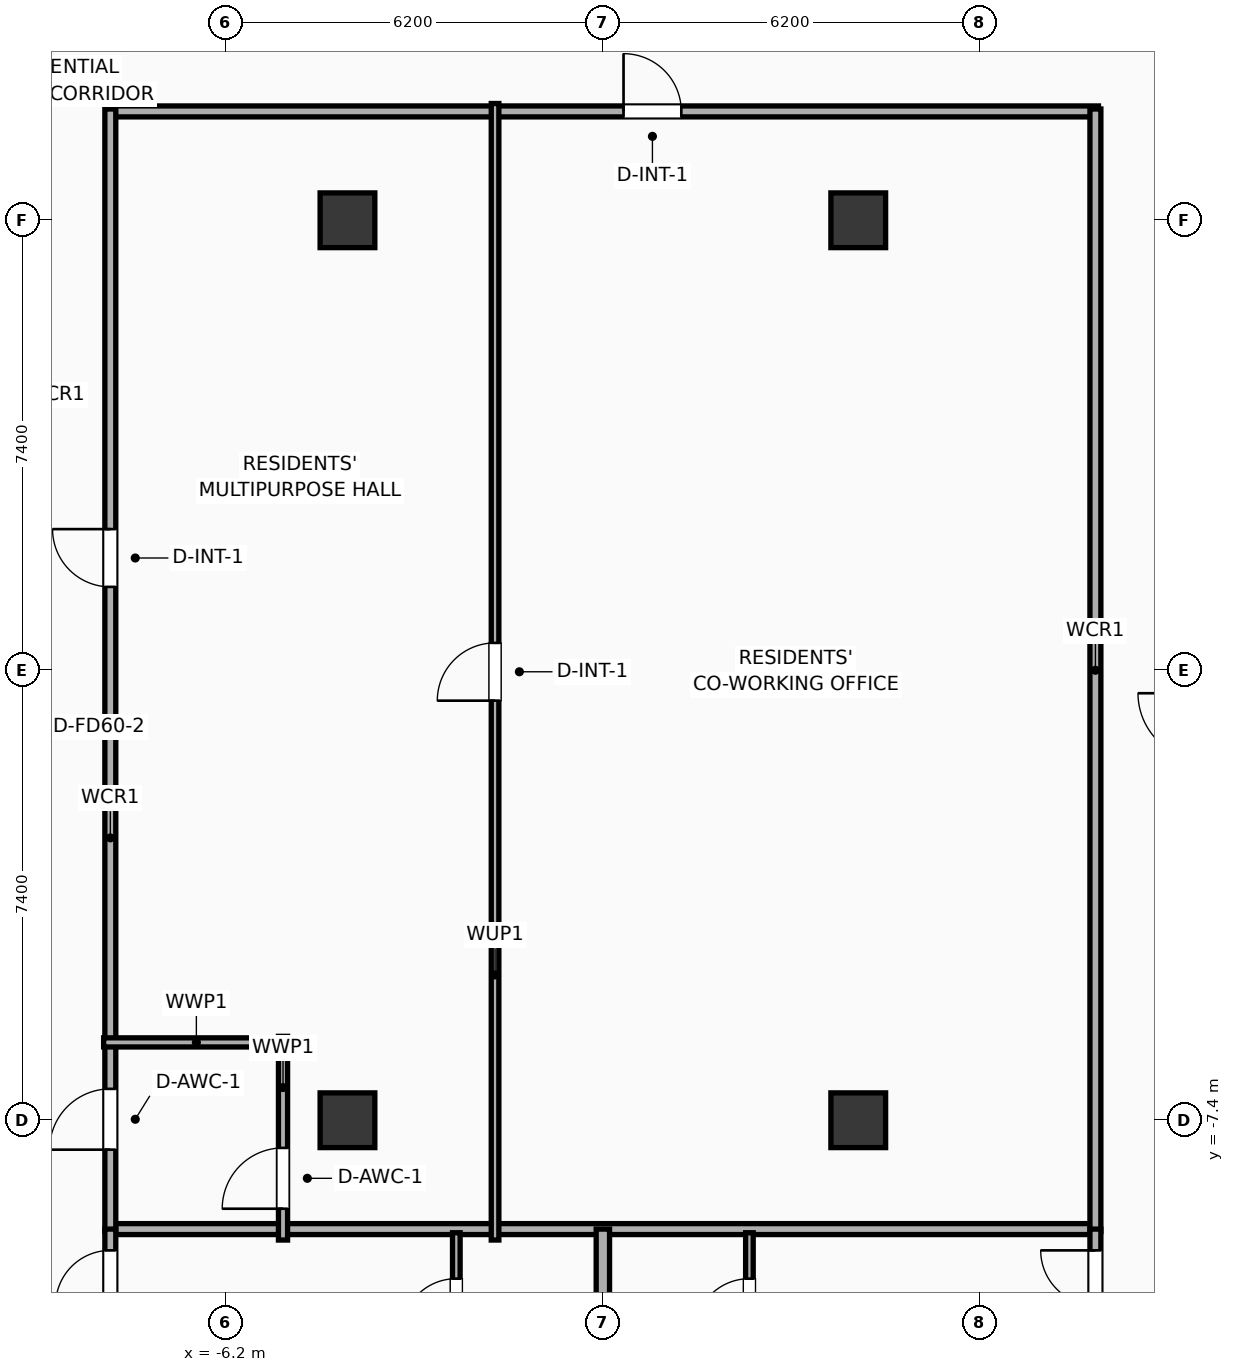
"""IFC4 building model, lengths in metres.
Left out: names, types, materials, properties, quantities, classifications, styles, units other than length and angle.
Written with IfcOpenShell. Run it as: python <this file> out.ifc"""

import sys

from ifc_helpers import new_model, si_unit, direction, frame, frame_2d, origin, origin_2d, place, context, subcontext, project, spatial, rectangle, extrude, element, fill, save


model = new_model("IFC4")
c1 = context("Model", 3, precision=1e-05, world=origin(), true_north=direction((0.0, 1.0)))
c2 = subcontext(c1, "Body", "Model", "MODEL_VIEW")
j1 = project(units=[si_unit("LENGTHUNIT", "METRE"), si_unit("PLANEANGLEUNIT", "RADIAN")], contexts=[c1])
p1 = place(None, origin())
s1 = spatial("IfcSite", under=j1, at=p1, CompositionType="ELEMENT")
p2 = place(p1, origin())
s2 = spatial("IfcBuilding", under=s1, at=p2, CompositionType="ELEMENT")
p3 = place(p2, frame((0.0, 0.0, 215.8)))
s3 = spatial("IfcBuildingStorey", under=s2, at=p3, CompositionType="ELEMENT", Elevation=215.8)
for number, where, z_axis, x_axis in (
    (1, (-4.2, -7.4, 0.0), (0.0, 0.0, 1.0), (1.0, 0.0, 0.0)),
    (2, (-4.2, 7.4, 0.0), (0.0, 0.0, 1.0), (1.0, 0.0, 0.0)),
    (3, (4.2, -7.4, 0.0), (0.0, 0.0, 1.0), (1.0, 0.0, 0.0)),
    (4, (4.2, 7.4, 0.0), (0.0, 0.0, 1.0), (1.0, 0.0, 0.0)),
):
    element("IfcColumn", number, at=place(p3, frame(where, z_axis=z_axis, x_axis=x_axis)), inside=s3, PredefinedType="COLUMN", context=c2, shape_type="SweptSolid", body=[
        extrude(rectangle(XDim=0.9, YDim=0.9, at=origin_2d()), origin(), (0.0, 0.0, 1.0), 3.9),
    ])
p4 = place(p3, frame((-8.15, 9.19, 0.0), z_axis=(0.0, 0.0, 1.0), x_axis=(1.0, 0.0, 0.0)))
e5 = element("IfcWall", 5, at=p4, inside=s3, PredefinedType="PARTITIONING", context=c2, shape_type="SweptSolid", body=[
    extrude(rectangle(XDim=16.3, YDim=0.18, at=frame_2d((8.15, 0.0))), origin(), (0.0, 0.0, 1.0), 3.65),
])
p5 = place(p4, frame((8.49, 0.0, 0.0)))
e6 = element("IfcOpeningElement", 6, at=p5, cuts=e5, PredefinedType="OPENING", context=c2, shape_type="SweptSolid", body=[
    extrude(rectangle(XDim=0.95, YDim=2.05, at=frame_2d((0.475, 1.025))), frame((0.0, 0.1, 0.0), z_axis=(0.0, -1.0, 0.0), x_axis=(1.0, 0.0, 0.0)), (0.0, 0.0, 1.0), 0.2),
])
p6 = place(p3, frame((-8.15, -9.19, 0.0), z_axis=(0.0, 0.0, 1.0), x_axis=(1.0, 0.0, 0.0)))
e7 = element("IfcWall", 7, at=p6, inside=s3, PredefinedType="PARTITIONING", context=c2, shape_type="SweptSolid", body=[
    extrude(rectangle(XDim=16.3, YDim=0.18, at=frame_2d((8.15, 0.0))), origin(), (0.0, 0.0, 1.0), 3.65),
])
p7 = place(p3, frame((-8.1, -9.23, 0.0), z_axis=(0.0, 0.0, 1.0), x_axis=(0.0, 1.0, 0.0)))
e8 = element("IfcWall", 8, at=p7, inside=s3, PredefinedType="PARTITIONING", context=c2, shape_type="SweptSolid", body=[
    extrude(rectangle(XDim=18.46, YDim=0.18, at=frame_2d((9.23, 0.0))), origin(), (0.0, 0.0, 1.0), 3.65),
])
p8 = place(p7, frame((1.346, 0.0, 0.0)))
e9 = element("IfcOpeningElement", 9, at=p8, cuts=e8, PredefinedType="OPENING", context=c2, shape_type="SweptSolid", body=[
    extrude(rectangle(XDim=1.0, YDim=2.05, at=frame_2d((0.5, 1.025))), frame((0.0, 0.1, 0.0), z_axis=(0.0, -1.0, 0.0), x_axis=(1.0, 0.0, 0.0)), (0.0, 0.0, 1.0), 0.2),
])
p9 = place(p7, frame((10.601, 0.0, 0.0)))
e10 = element("IfcOpeningElement", 10, at=p9, cuts=e8, PredefinedType="OPENING", context=c2, shape_type="SweptSolid", body=[
    extrude(rectangle(XDim=0.95, YDim=2.05, at=frame_2d((0.475, 1.025))), frame((0.0, 0.1, 0.0), z_axis=(0.0, -1.0, 0.0), x_axis=(1.0, 0.0, 0.0)), (0.0, 0.0, 1.0), 0.2),
])
p10 = place(p3, frame((8.1, -9.23, 0.0), z_axis=(0.0, 0.0, 1.0), x_axis=(0.0, 1.0, 0.0)))
e11 = element("IfcWall", 11, at=p10, inside=s3, PredefinedType="PARTITIONING", context=c2, shape_type="SweptSolid", body=[
    extrude(rectangle(XDim=18.46, YDim=0.18, at=frame_2d((9.23, 0.0))), origin(), (0.0, 0.0, 1.0), 3.65),
])
p11 = place(p3, frame((-5.26, -9.37, 0.0), z_axis=(0.0, 0.0, 1.0), x_axis=(0.0, 1.0, 0.0)))
e12 = element("IfcWall", 12, at=p11, inside=s3, PredefinedType="PLUMBINGWALL", context=c2, shape_type="SweptSolid", body=[
    extrude(rectangle(XDim=3.35, YDim=0.15, at=frame_2d((1.675, 0.0))), origin(), (0.0, 0.0, 1.0), 3.65),
])
p12 = place(p11, frame((0.515, 0.0, 0.0)))
e13 = element("IfcOpeningElement", 13, at=p12, cuts=e12, PredefinedType="OPENING", context=c2, shape_type="SweptSolid", body=[
    extrude(rectangle(XDim=1.0, YDim=2.05, at=frame_2d((0.5, 1.025))), frame((0.0, 0.085, 0.0), z_axis=(0.0, -1.0, 0.0), x_axis=(1.0, 0.0, 0.0)), (0.0, 0.0, 1.0), 0.17),
])
p13 = place(p3, frame((-8.21, -6.12, 0.0), z_axis=(0.0, 0.0, 1.0), x_axis=(1.0, 0.0, 0.0)))
e14 = element("IfcWall", 14, at=p13, inside=s3, PredefinedType="PLUMBINGWALL", context=c2, shape_type="SweptSolid", body=[
    extrude(rectangle(XDim=3.05, YDim=0.15, at=frame_2d((1.525, 0.0))), origin(), (0.0, 0.0, 1.0), 3.65),
])
p14 = place(p3, frame((-1.773, -9.37, 0.0), z_axis=(0.0, 0.0, 1.0), x_axis=(0.0, 1.0, 0.0)))
e15 = element("IfcWall", 15, at=p14, inside=s3, PredefinedType="PARTITIONING", context=c2, shape_type="SweptSolid", body=[
    extrude(rectangle(XDim=18.69, YDim=0.125, at=frame_2d((9.345, 0.0))), origin(), (0.0, 0.0, 1.0), 3.65),
])
p15 = place(p14, frame((8.87, 0.0, 0.0)))
e16 = element("IfcOpeningElement", 16, at=p15, cuts=e15, PredefinedType="OPENING", context=c2, shape_type="SweptSolid", body=[
    extrude(rectangle(XDim=0.95, YDim=2.05, at=frame_2d((0.475, 1.025))), frame((0.0, 0.073, 0.0), z_axis=(0.0, -1.0, 0.0), x_axis=(1.0, 0.0, 0.0)), (0.0, 0.0, 1.0), 0.145),
])
p16 = place(p3, frame((-2.41, -11.66, 0.0), z_axis=(0.0, 0.0, 1.0), x_axis=(0.0, 1.0, 0.0)))
e17 = element("IfcWall", 17, at=p16, inside=s3, PredefinedType="PARTITIONING", context=c2, shape_type="SweptSolid", body=[
    extrude(rectangle(XDim=2.41, YDim=0.125, at=frame_2d((1.205, 0.0))), origin(), (0.0, 0.0, 1.0), 3.65),
])
p17 = place(p16, frame((0.755, 0.0, 0.0)))
e18 = element("IfcOpeningElement", 18, at=p17, cuts=e17, PredefinedType="OPENING", context=c2, shape_type="SweptSolid", body=[
    extrude(rectangle(XDim=0.9, YDim=2.05, at=frame_2d((0.45, 1.025))), frame((0.0, 0.073, 0.0), z_axis=(0.0, -1.0, 0.0), x_axis=(1.0, 0.0, 0.0)), (0.0, 0.0, 1.0), 0.145),
])
p18 = place(p3, frame((-8.1, -18.83, 0.0), z_axis=(0.0, 0.0, 1.0), x_axis=(0.0, 1.0, 0.0)))
e19 = element("IfcWall", 19, at=p18, inside=s3, PredefinedType="PARTITIONING", context=c2, shape_type="SweptSolid", body=[
    extrude(rectangle(XDim=9.64, YDim=0.18, at=frame_2d((4.82, 0.0))), origin(), (0.0, 0.0, 1.0), 3.65),
])
p19 = place(p18, frame((8.39, 0.0, 0.0)))
e20 = element("IfcOpeningElement", 20, at=p19, cuts=e19, PredefinedType="OPENING", context=c2, shape_type="SweptSolid", body=[
    extrude(rectangle(XDim=0.9, YDim=2.05, at=frame_2d((0.45, 1.025))), frame((0.0, 0.1, 0.0), z_axis=(0.0, -1.0, 0.0), x_axis=(1.0, 0.0, 0.0)), (0.0, 0.0, 1.0), 0.2),
])
p20 = place(p3, frame((2.41, -11.66, 0.0), z_axis=(0.0, 0.0, 1.0), x_axis=(0.0, 1.0, 0.0)))
e21 = element("IfcWall", 21, at=p20, inside=s3, PredefinedType="PARTITIONING", context=c2, shape_type="SweptSolid", body=[
    extrude(rectangle(XDim=2.41, YDim=0.125, at=frame_2d((1.205, 0.0))), origin(), (0.0, 0.0, 1.0), 3.65),
])
p21 = place(p20, frame((0.755, 0.0, 0.0)))
e22 = element("IfcOpeningElement", 22, at=p21, cuts=e21, PredefinedType="OPENING", context=c2, shape_type="SweptSolid", body=[
    extrude(rectangle(XDim=0.9, YDim=2.05, at=frame_2d((0.45, 1.025))), frame((0.0, 0.073, 0.0), z_axis=(0.0, -1.0, 0.0), x_axis=(1.0, 0.0, 0.0)), (0.0, 0.0, 1.0), 0.145),
])
p22 = place(p3, frame((8.1, -18.83, 0.0), z_axis=(0.0, 0.0, 1.0), x_axis=(0.0, 1.0, 0.0)))
e23 = element("IfcWall", 23, at=p22, inside=s3, PredefinedType="PARTITIONING", context=c2, shape_type="SweptSolid", body=[
    extrude(rectangle(XDim=9.64, YDim=0.18, at=frame_2d((4.82, 0.0))), origin(), (0.0, 0.0, 1.0), 3.65),
])
p23 = place(p22, frame((8.39, 0.0, 0.0)))
e24 = element("IfcOpeningElement", 24, at=p23, cuts=e23, PredefinedType="OPENING", context=c2, shape_type="SweptSolid", body=[
    extrude(rectangle(XDim=0.9, YDim=2.05, at=frame_2d((0.45, 1.025))), frame((0.0, 0.1, 0.0), z_axis=(0.0, -1.0, 0.0), x_axis=(1.0, 0.0, 0.0)), (0.0, 0.0, 1.0), 0.2),
])
p24 = place(p3, frame((0.0, -18.83, 0.0), z_axis=(0.0, 0.0, 1.0), x_axis=(0.0, 1.0, 0.0)))
e25 = element("IfcWall", 25, at=p24, inside=s3, PredefinedType="PARTITIONING", context=c2, shape_type="SweptSolid", body=[
    extrude(rectangle(XDim=9.64, YDim=0.22, at=frame_2d((4.82, 0.0))), origin(), (0.0, 0.0, 1.0), 3.65),
])
p25 = place(p5, origin())
e26 = element("IfcDoor", 26, at=p25, inside=s3, OperationType="SINGLE_SWING_LEFT", PredefinedType="DOOR", context=c2, shape_type="SweptSolid", body=[
    extrude(rectangle(XDim=0.95, YDim=2.05, at=frame_2d((0.475, 1.025))), frame((0.0, 0.025, 0.0), z_axis=(0.0, -1.0, 0.0), x_axis=(1.0, 0.0, 0.0)), (0.0, 0.0, 1.0), 0.05),
])
fill(e6, e26)
p26 = place(p8, origin())
e27 = element("IfcDoor", 27, at=p26, inside=s3, OperationType="SINGLE_SWING_LEFT", PredefinedType="DOOR", context=c2, shape_type="SweptSolid", body=[
    extrude(rectangle(XDim=1.0, YDim=2.05, at=frame_2d((0.5, 1.025))), frame((0.0, 0.025, 0.0), z_axis=(0.0, -1.0, 0.0), x_axis=(1.0, 0.0, 0.0)), (0.0, 0.0, 1.0), 0.05),
])
fill(e9, e27)
p27 = place(p9, origin())
e28 = element("IfcDoor", 28, at=p27, inside=s3, OperationType="SINGLE_SWING_RIGHT", PredefinedType="DOOR", context=c2, shape_type="SweptSolid", body=[
    extrude(rectangle(XDim=0.95, YDim=2.05, at=frame_2d((0.475, 1.025))), frame((0.0, 0.025, 0.0), z_axis=(0.0, -1.0, 0.0), x_axis=(1.0, 0.0, 0.0)), (0.0, 0.0, 1.0), 0.05),
])
fill(e10, e28)
p28 = place(p12, origin())
e29 = element("IfcDoor", 29, at=p28, inside=s3, OperationType="SINGLE_SWING_LEFT", PredefinedType="DOOR", context=c2, shape_type="SweptSolid", body=[
    extrude(rectangle(XDim=1.0, YDim=2.05, at=frame_2d((0.5, 1.025))), frame((0.0, 0.025, 0.0), z_axis=(0.0, -1.0, 0.0), x_axis=(1.0, 0.0, 0.0)), (0.0, 0.0, 1.0), 0.05),
])
fill(e13, e29)
p29 = place(p15, origin())
e30 = element("IfcDoor", 30, at=p29, inside=s3, OperationType="SINGLE_SWING_LEFT", PredefinedType="DOOR", context=c2, shape_type="SweptSolid", body=[
    extrude(rectangle(XDim=0.95, YDim=2.05, at=frame_2d((0.475, 1.025))), frame((0.0, 0.025, 0.0), z_axis=(0.0, -1.0, 0.0), x_axis=(1.0, 0.0, 0.0)), (0.0, 0.0, 1.0), 0.05),
])
fill(e16, e30)
p30 = place(p17, origin())
e31 = element("IfcDoor", 31, at=p30, inside=s3, OperationType="SINGLE_SWING_LEFT", PredefinedType="DOOR", context=c2, shape_type="SweptSolid", body=[
    extrude(rectangle(XDim=0.9, YDim=2.05, at=frame_2d((0.45, 1.025))), frame((0.0, 0.025, 0.0), z_axis=(0.0, -1.0, 0.0), x_axis=(1.0, 0.0, 0.0)), (0.0, 0.0, 1.0), 0.05),
])
fill(e18, e31)
p31 = place(p19, origin())
e32 = element("IfcDoor", 32, at=p31, inside=s3, OperationType="SINGLE_SWING_LEFT", PredefinedType="DOOR", context=c2, shape_type="SweptSolid", body=[
    extrude(rectangle(XDim=0.9, YDim=2.05, at=frame_2d((0.45, 1.025))), frame((0.0, 0.025, 0.0), z_axis=(0.0, -1.0, 0.0), x_axis=(1.0, 0.0, 0.0)), (0.0, 0.0, 1.0), 0.05),
])
fill(e20, e32)
p32 = place(p21, origin())
e33 = element("IfcDoor", 33, at=p32, inside=s3, OperationType="SINGLE_SWING_LEFT", PredefinedType="DOOR", context=c2, shape_type="SweptSolid", body=[
    extrude(rectangle(XDim=0.9, YDim=2.05, at=frame_2d((0.45, 1.025))), frame((0.0, 0.025, 0.0), z_axis=(0.0, -1.0, 0.0), x_axis=(1.0, 0.0, 0.0)), (0.0, 0.0, 1.0), 0.05),
])
fill(e22, e33)
p33 = place(p23, origin())
e34 = element("IfcDoor", 34, at=p33, inside=s3, OperationType="SINGLE_SWING_RIGHT", PredefinedType="DOOR", context=c2, shape_type="SweptSolid", body=[
    extrude(rectangle(XDim=0.9, YDim=2.05, at=frame_2d((0.45, 1.025))), frame((0.0, 0.025, 0.0), z_axis=(0.0, -1.0, 0.0), x_axis=(1.0, 0.0, 0.0)), (0.0, 0.0, 1.0), 0.05),
])
fill(e24, e34)
save(model, sys.argv[1])
